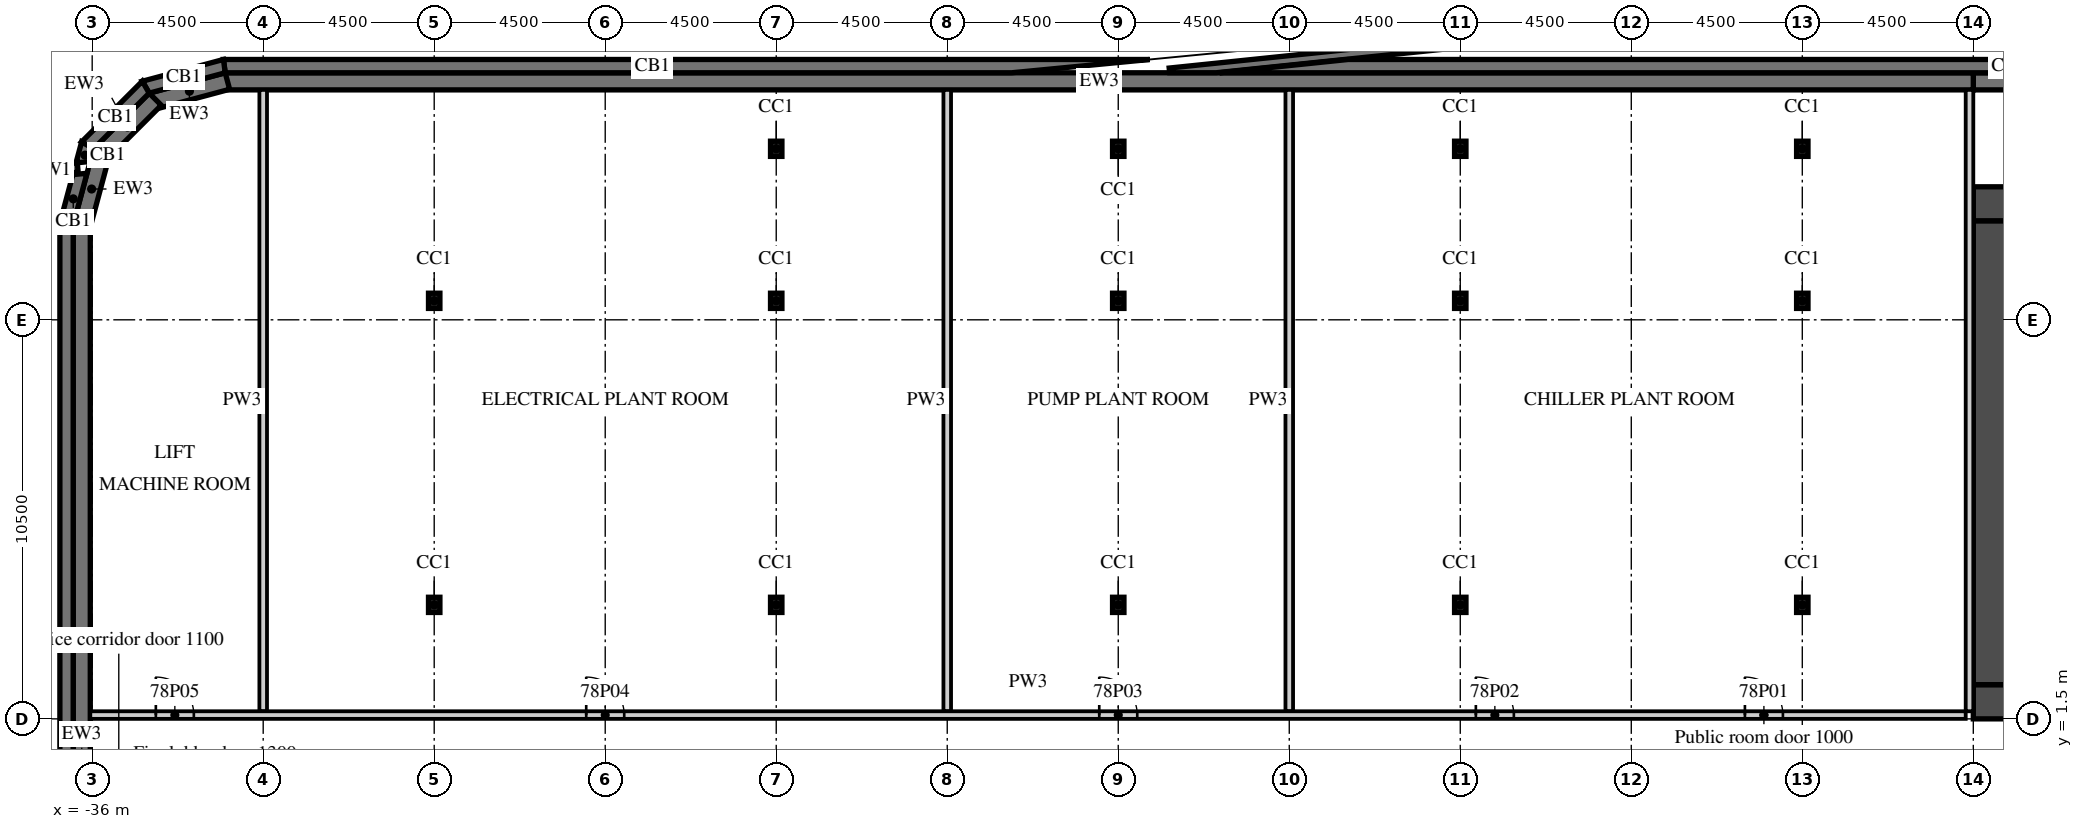
"""IFC4 building model, lengths in metres.
Left out: names, types, materials, properties, quantities, classifications, styles, units other than length and angle.
Written with IfcOpenShell. Run it as: python <this file> out.ifc"""

import sys

from ifc_helpers import new_model, si_unit, direction, frame, frame_2d, origin, origin_2d, place, context, subcontext, project, spatial, polyline, rectangle, i_section, outline, extrude, element, fill, save


model = new_model("IFC4")
c1 = context("Model", 3, precision=1e-05, world=origin(), true_north=direction((0.0, 1.0)))
c2 = subcontext(c1, "Body", "Model", "MODEL_VIEW")
j1 = project(units=[si_unit("LENGTHUNIT", "METRE"), si_unit("PLANEANGLEUNIT", "RADIAN")], contexts=[c1])
p1 = place(None, origin())
s1 = spatial("IfcSite", under=j1, at=p1, CompositionType="ELEMENT")
p2 = place(p1, origin())
s2 = spatial("IfcBuilding", under=s1, at=p2, CompositionType="ELEMENT")
p3 = place(p2, frame((0.0, 0.0, 308.1)))
s3 = spatial("IfcBuildingStorey", under=s2, at=p3, CompositionType="ELEMENT", Elevation=308.1)
for number, where, z_axis, x_axis in (
    (1, (-27.0, 4.5, 0.0), (0.0, 0.0, 1.0), (1.0, 0.0, 0.0)),
    (2, (-27.0, 12.5, 0.0), (0.0, 0.0, 1.0), (1.0, 0.0, 0.0)),
    (3, (-18.0, 4.5, 0.0), (0.0, 0.0, 1.0), (1.0, 0.0, 0.0)),
    (4, (-18.0, 12.5, 0.0), (0.0, 0.0, 1.0), (1.0, 0.0, 0.0)),
    (5, (-18.0, 16.5, 0.0), (0.0, 0.0, 1.0), (1.0, 0.0, 0.0)),
    (6, (-9.0, 4.5, 0.0), (0.0, 0.0, 1.0), (1.0, 0.0, 0.0)),
    (7, (-9.0, 12.5, 0.0), (0.0, 0.0, 1.0), (1.0, 0.0, 0.0)),
    (8, (-9.0, 16.5, 0.0), (0.0, 0.0, 1.0), (1.0, 0.0, 0.0)),
    (9, (0.0, 4.5, 0.0), (0.0, 0.0, 1.0), (1.0, 0.0, 0.0)),
    (10, (0.0, 12.5, 0.0), (0.0, 0.0, 1.0), (1.0, 0.0, 0.0)),
    (11, (0.0, 16.5, 0.0), (0.0, 0.0, 1.0), (1.0, 0.0, 0.0)),
    (12, (9.0, 4.5, 0.0), (0.0, 0.0, 1.0), (1.0, 0.0, 0.0)),
    (13, (9.0, 12.5, 0.0), (0.0, 0.0, 1.0), (1.0, 0.0, 0.0)),
    (14, (9.0, 16.5, 0.0), (0.0, 0.0, 1.0), (1.0, 0.0, 0.0)),
):
    element("IfcColumn", number, at=place(p3, frame(where, z_axis=z_axis, x_axis=x_axis)), inside=s3, PredefinedType="COLUMN", context=c2, shape_type="SweptSolid", body=[
        extrude(i_section(OverallWidth=0.3, OverallDepth=0.4, WebThickness=0.013, FlangeThickness=0.024, FilletRadius=0.027, at=origin_2d()), origin(), (0.0, 0.0, 1.0), 5.5),
    ])
p4 = place(p3, frame((31.5, 18.275, 0.0), z_axis=(0.0, 0.0, 1.0), x_axis=(-1.0, 0.0, 0.0)))
e15 = element("IfcWall", 15, at=p4, inside=s3, PredefinedType="SOLIDWALL", context=c2, shape_type="SweptSolid", body=[
    extrude(rectangle(XDim=18.0, YDim=0.45, at=frame_2d((9.0, 0.0))), origin(), (0.0, 0.0, 1.0), 5.1),
])
p5 = place(p3, frame((13.5, 18.275, 0.0), z_axis=(0.0, 0.0, 1.0), x_axis=(-1.0, 0.0, 0.0)))
e16 = element("IfcWall", 16, at=p5, inside=s3, PredefinedType="SOLIDWALL", context=c2, shape_type="SweptSolid", body=[
    extrude(rectangle(XDim=46.0, YDim=0.45, at=frame_2d((23.0, 0.0))), origin(), (0.0, 0.0, 1.0), 5.1),
])
p6 = place(p3, frame((-32.442, 18.283, 0.0), z_axis=(0.0, 0.0, 1.0), x_axis=(-0.965926999034, -0.25881466832, 0.0)))
e17 = element("IfcWall", 17, at=p6, inside=s3, PredefinedType="SOLIDWALL", context=c2, shape_type="SweptSolid", body=[
    extrude(outline(polyline([(0.0, -0.225), (2.071, -0.225), (1.95, 0.225), (0.121, 0.225), (0.0, -0.225)])), origin(), (0.0, 0.0, 1.0), 5.1),
])
p7 = place(p3, frame((-34.341, 17.805, 0.0), z_axis=(0.0, 0.0, 1.0), x_axis=(-0.707106781187, -0.707106781187, 0.0)))
e18 = element("IfcWall", 18, at=p7, inside=s3, PredefinedType="SOLIDWALL", context=c2, shape_type="SweptSolid", body=[
    extrude(outline(polyline([(0.0, -0.225), (2.071, -0.225), (1.95, 0.225), (0.121, 0.225), (0.0, -0.225)])), origin(), (0.0, 0.0, 1.0), 5.1),
])
p8 = place(p3, frame((-35.747, 16.442, 0.0), z_axis=(0.0, 0.0, 1.0), x_axis=(-0.25881466832, -0.965926999034, 0.0)))
e19 = element("IfcWall", 19, at=p8, inside=s3, PredefinedType="SOLIDWALL", context=c2, shape_type="SweptSolid", body=[
    extrude(outline(polyline([(-0.0, -0.225), (2.07, -0.225), (1.95, 0.225), (0.12, 0.225), (-0.0, -0.225)])), origin(), (0.0, 0.0, 1.0), 5.1),
])
p9 = place(p3, frame((-36.275, 14.5, 0.0), z_axis=(0.0, 0.0, 1.0), x_axis=(0.0, -1.0, 0.0)))
e20 = element("IfcWall", 20, at=p9, inside=s3, PredefinedType="SOLIDWALL", context=c2, shape_type="SweptSolid", body=[
    extrude(rectangle(XDim=29.0, YDim=0.45, at=frame_2d((14.5, 0.0))), origin(), (0.0, 0.0, 1.0), 5.1),
])
p10 = place(p3, origin())
e21 = element("IfcWall", 21, at=p10, inside=s3, PredefinedType="PARAPET", context=c2, shape_type="SweptSolid", body=[
    extrude(outline(polyline([(-37.758, 16.001), (-37.701, 15.756), (-36.369, 15.884), (-36.393, 16.133), (-37.758, 16.001)])), origin(), (0.0, 0.0, 1.0), 1.1),
])
p11 = place(p3, origin())
e22 = element("IfcWall", 22, at=p11, inside=s3, PredefinedType="PARAPET", context=c2, shape_type="SweptSolid", body=[
    extrude(outline(polyline([(-7.66, 18.624), (-7.647, 18.501), (-6.422, 18.501), (30.933, 22.364), (30.907, 22.613), (-7.66, 18.624)])), origin(), (0.0, 0.0, 1.0), 1.1),
])
p12 = place(p3, origin())
e23 = element("IfcWall", 23, at=p12, inside=s3, PredefinedType="SOLIDWALL", context=c2, shape_type="SweptSolid", body=[
    extrude(outline(polyline([(33.5, 18.5), (33.546, 18.85), (-2.95, 18.85), (-6.335, 18.5), (33.5, 18.5)])), origin(), (0.0, 0.0, 1.0), 2.0),
])
p13 = place(p3, origin())
e24 = element("IfcWall", 24, at=p13, inside=s3, PredefinedType="SOLIDWALL", context=c2, shape_type="SweptSolid", body=[
    extrude(outline(polyline([(-11.807, 18.5), (-8.172, 18.85), (-32.546, 18.85), (-32.5, 18.5), (-11.807, 18.5)])), origin(), (0.0, 0.0, 1.0), 2.0),
])
p14 = place(p3, origin())
e25 = element("IfcWall", 25, at=p14, inside=s3, PredefinedType="SOLIDWALL", context=c2, shape_type="SweptSolid", body=[
    extrude(outline(polyline([(-32.5, 18.5), (-32.546, 18.85), (-34.681, 18.278), (-34.5, 17.964), (-32.5, 18.5)])), origin(), (0.0, 0.0, 1.0), 2.0),
])
p15 = place(p3, origin())
e26 = element("IfcWall", 26, at=p15, inside=s3, PredefinedType="SOLIDWALL", context=c2, shape_type="SweptSolid", body=[
    extrude(outline(polyline([(-34.5, 17.964), (-34.681, 18.278), (-36.278, 16.681), (-35.964, 16.5), (-34.5, 17.964)])), origin(), (0.0, 0.0, 1.0), 2.0),
])
p16 = place(p3, origin())
e27 = element("IfcWall", 27, at=p16, inside=s3, PredefinedType="SOLIDWALL", context=c2, shape_type="SweptSolid", body=[
    extrude(outline(polyline([(-35.964, 16.5), (-36.278, 16.681), (-36.423, 16.14), (-36.384, 16.144), (-36.383, 16.134), (-36.054, 16.165), (-35.964, 16.5)])), origin(), (0.0, 0.0, 1.0), 2.0),
])
p17 = place(p3, origin())
e28 = element("IfcWall", 28, at=p17, inside=s3, PredefinedType="SOLIDWALL", context=c2, shape_type="SweptSolid", body=[
    extrude(outline(polyline([(-36.137, 15.856), (-36.509, 15.82), (-36.85, 14.546), (-36.5, 14.5), (-36.137, 15.856)])), origin(), (0.0, 0.0, 1.0), 2.0),
])
p18 = place(p3, origin())
e29 = element("IfcWall", 29, at=p18, inside=s3, PredefinedType="SOLIDWALL", context=c2, shape_type="SweptSolid", body=[
    extrude(outline(polyline([(-36.5, 14.5), (-36.85, 14.546), (-36.85, -14.546), (-36.5, -14.5), (-36.5, 14.5)])), origin(), (0.0, 0.0, 1.0), 2.0),
])
p19 = place(p3, frame((13.5, 1.95, 0.0), z_axis=(0.0, 0.0, 1.0), x_axis=(1.0, 0.0, 0.0)))
e30 = element("IfcWall", 30, at=p19, inside=s3, PredefinedType="SHEAR", context=c2, shape_type="SweptSolid", body=[
    extrude(rectangle(XDim=18.0, YDim=0.9, at=frame_2d((9.0, 0.0))), origin(), (0.0, 0.0, 1.0), 5.1),
])
p20 = place(p19, frame((1.475, 0.0, 0.0)))
e31 = element("IfcOpeningElement", 31, at=p20, cuts=e30, PredefinedType="OPENING", context=c2, shape_type="SweptSolid", body=[
    extrude(rectangle(XDim=1.8, YDim=2.1, at=frame_2d((0.9, 1.05))), frame((0.0, 0.46, 0.0), z_axis=(0.0, -1.0, 0.0), x_axis=(1.0, 0.0, 0.0)), (0.0, 0.0, 1.0), 0.92),
])
p21 = place(p3, frame((13.5, 15.05, 0.0), z_axis=(0.0, 0.0, 1.0), x_axis=(1.0, 0.0, 0.0)))
e32 = element("IfcWall", 32, at=p21, inside=s3, PredefinedType="SHEAR", context=c2, shape_type="SweptSolid", body=[
    extrude(rectangle(XDim=6.8, YDim=0.9, at=frame_2d((3.4, 0.0))), origin(), (0.0, 0.0, 1.0), 5.1),
])
p22 = place(p21, frame((4.725, 0.0, 0.0)))
e33 = element("IfcOpeningElement", 33, at=p22, cuts=e32, PredefinedType="OPENING", context=c2, shape_type="SweptSolid", body=[
    extrude(rectangle(XDim=1.2, YDim=2.1, at=frame_2d((0.6, 1.05))), frame((0.0, 0.46, 0.0), z_axis=(0.0, -1.0, 0.0), x_axis=(1.0, 0.0, 0.0)), (0.0, 0.0, 1.0), 0.92),
])
p23 = place(p3, frame((13.95, 2.4, 0.0), z_axis=(0.0, 0.0, 1.0), x_axis=(0.0, 1.0, 0.0)))
e34 = element("IfcWall", 34, at=p23, inside=s3, PredefinedType="SHEAR", context=c2, shape_type="SweptSolid", body=[
    extrude(rectangle(XDim=12.2, YDim=0.9, at=frame_2d((6.1, 0.0))), origin(), (0.0, 0.0, 1.0), 5.1),
])
for number, where, z_axis, x_axis in (
    (35, (-4.5, 1.7, 0.0), (0.0, 0.0, 1.0), (0.0, 1.0, 0.0)),
    (36, (-13.5, 1.7, 0.0), (0.0, 0.0, 1.0), (0.0, 1.0, 0.0)),
    (37, (-31.5, 1.7, 0.0), (0.0, 0.0, 1.0), (0.0, 1.0, 0.0)),
):
    element("IfcWall", number, at=place(p3, frame(where, z_axis=z_axis, x_axis=x_axis)), inside=s3, PredefinedType="PARTITIONING", context=c2, shape_type="SweptSolid", body=[
        extrude(rectangle(XDim=16.35, YDim=0.2, at=frame_2d((8.175, 0.0))), origin(), (0.0, 0.0, 1.0), 5.1),
    ])
p24 = place(p3, frame((-36.05, 1.6, 0.0), z_axis=(0.0, 0.0, 1.0), x_axis=(1.0, 0.0, 0.0)))
e38 = element("IfcWall", 38, at=p24, inside=s3, PredefinedType="PARTITIONING", context=c2, shape_type="SweptSolid", body=[
    extrude(rectangle(XDim=49.35, YDim=0.2, at=frame_2d((24.675, 0.0))), origin(), (0.0, 0.0, 1.0), 4.6),
])
p25 = place(p24, frame((43.54, 0.0, 0.0)))
e39 = element("IfcOpeningElement", 39, at=p25, cuts=e38, PredefinedType="OPENING", context=c2, shape_type="SweptSolid", body=[
    extrude(rectangle(XDim=1.0, YDim=2.1, at=frame_2d((0.5, 1.05))), frame((0.0, 0.11, 0.0), z_axis=(0.0, -1.0, 0.0), x_axis=(1.0, 0.0, 0.0)), (0.0, 0.0, 1.0), 0.22),
])
p26 = place(p24, frame((36.46, 0.0, 0.0)))
e40 = element("IfcOpeningElement", 40, at=p26, cuts=e38, PredefinedType="OPENING", context=c2, shape_type="SweptSolid", body=[
    extrude(rectangle(XDim=1.0, YDim=2.1, at=frame_2d((0.5, 1.05))), frame((0.0, 0.11, 0.0), z_axis=(0.0, -1.0, 0.0), x_axis=(1.0, 0.0, 0.0)), (0.0, 0.0, 1.0), 0.22),
])
p27 = place(p24, frame((26.55, 0.0, 0.0)))
e41 = element("IfcOpeningElement", 41, at=p27, cuts=e38, PredefinedType="OPENING", context=c2, shape_type="SweptSolid", body=[
    extrude(rectangle(XDim=1.0, YDim=2.1, at=frame_2d((0.5, 1.05))), frame((0.0, 0.11, 0.0), z_axis=(0.0, -1.0, 0.0), x_axis=(1.0, 0.0, 0.0)), (0.0, 0.0, 1.0), 0.22),
])
p28 = place(p24, frame((13.05, 0.0, 0.0)))
e42 = element("IfcOpeningElement", 42, at=p28, cuts=e38, PredefinedType="OPENING", context=c2, shape_type="SweptSolid", body=[
    extrude(rectangle(XDim=1.0, YDim=2.1, at=frame_2d((0.5, 1.05))), frame((0.0, 0.11, 0.0), z_axis=(0.0, -1.0, 0.0), x_axis=(1.0, 0.0, 0.0)), (0.0, 0.0, 1.0), 0.22),
])
p29 = place(p24, frame((1.725, 0.0, 0.0)))
e43 = element("IfcOpeningElement", 43, at=p29, cuts=e38, PredefinedType="OPENING", context=c2, shape_type="SweptSolid", body=[
    extrude(rectangle(XDim=1.0, YDim=2.1, at=frame_2d((0.5, 1.05))), frame((0.0, 0.11, 0.0), z_axis=(0.0, -1.0, 0.0), x_axis=(1.0, 0.0, 0.0)), (0.0, 0.0, 1.0), 0.22),
])
p30 = place(p3, frame((13.4, 1.7, 0.0), z_axis=(0.0, 0.0, 1.0), x_axis=(0.0, 1.0, 0.0)))
e44 = element("IfcWall", 44, at=p30, inside=s3, PredefinedType="PARTITIONING", context=c2, shape_type="SweptSolid", body=[
    extrude(rectangle(XDim=16.35, YDim=0.2, at=frame_2d((8.175, 0.0))), origin(), (0.0, 0.0, 1.0), 5.1),
])
p31 = place(p25, origin())
e45 = element("IfcDoor", 45, at=p31, inside=s3, OperationType="SINGLE_SWING_LEFT", PredefinedType="DOOR", context=c2, shape_type="SweptSolid", body=[
    extrude(rectangle(XDim=1.0, YDim=2.1, at=frame_2d((0.5, 1.05))), frame((0.0, 0.025, 0.0), z_axis=(0.0, -1.0, 0.0), x_axis=(1.0, 0.0, 0.0)), (0.0, 0.0, 1.0), 0.05),
])
fill(e39, e45)
p32 = place(p26, origin())
e46 = element("IfcDoor", 46, at=p32, inside=s3, OperationType="SINGLE_SWING_LEFT", PredefinedType="DOOR", context=c2, shape_type="SweptSolid", body=[
    extrude(rectangle(XDim=1.0, YDim=2.1, at=frame_2d((0.5, 1.05))), frame((0.0, 0.025, 0.0), z_axis=(0.0, -1.0, 0.0), x_axis=(1.0, 0.0, 0.0)), (0.0, 0.0, 1.0), 0.05),
])
fill(e40, e46)
p33 = place(p27, origin())
e47 = element("IfcDoor", 47, at=p33, inside=s3, OperationType="SINGLE_SWING_LEFT", PredefinedType="DOOR", context=c2, shape_type="SweptSolid", body=[
    extrude(rectangle(XDim=1.0, YDim=2.1, at=frame_2d((0.5, 1.05))), frame((0.0, 0.025, 0.0), z_axis=(0.0, -1.0, 0.0), x_axis=(1.0, 0.0, 0.0)), (0.0, 0.0, 1.0), 0.05),
])
fill(e41, e47)
p34 = place(p28, origin())
e48 = element("IfcDoor", 48, at=p34, inside=s3, OperationType="SINGLE_SWING_LEFT", PredefinedType="DOOR", context=c2, shape_type="SweptSolid", body=[
    extrude(rectangle(XDim=1.0, YDim=2.1, at=frame_2d((0.5, 1.05))), frame((0.0, 0.025, 0.0), z_axis=(0.0, -1.0, 0.0), x_axis=(1.0, 0.0, 0.0)), (0.0, 0.0, 1.0), 0.05),
])
fill(e42, e48)
p35 = place(p29, origin())
e49 = element("IfcDoor", 49, at=p35, inside=s3, OperationType="SINGLE_SWING_LEFT", PredefinedType="DOOR", context=c2, shape_type="SweptSolid", body=[
    extrude(rectangle(XDim=1.0, YDim=2.1, at=frame_2d((0.5, 1.05))), frame((0.0, 0.025, 0.0), z_axis=(0.0, -1.0, 0.0), x_axis=(1.0, 0.0, 0.0)), (0.0, 0.0, 1.0), 0.05),
])
fill(e43, e49)
save(model, sys.argv[1])
